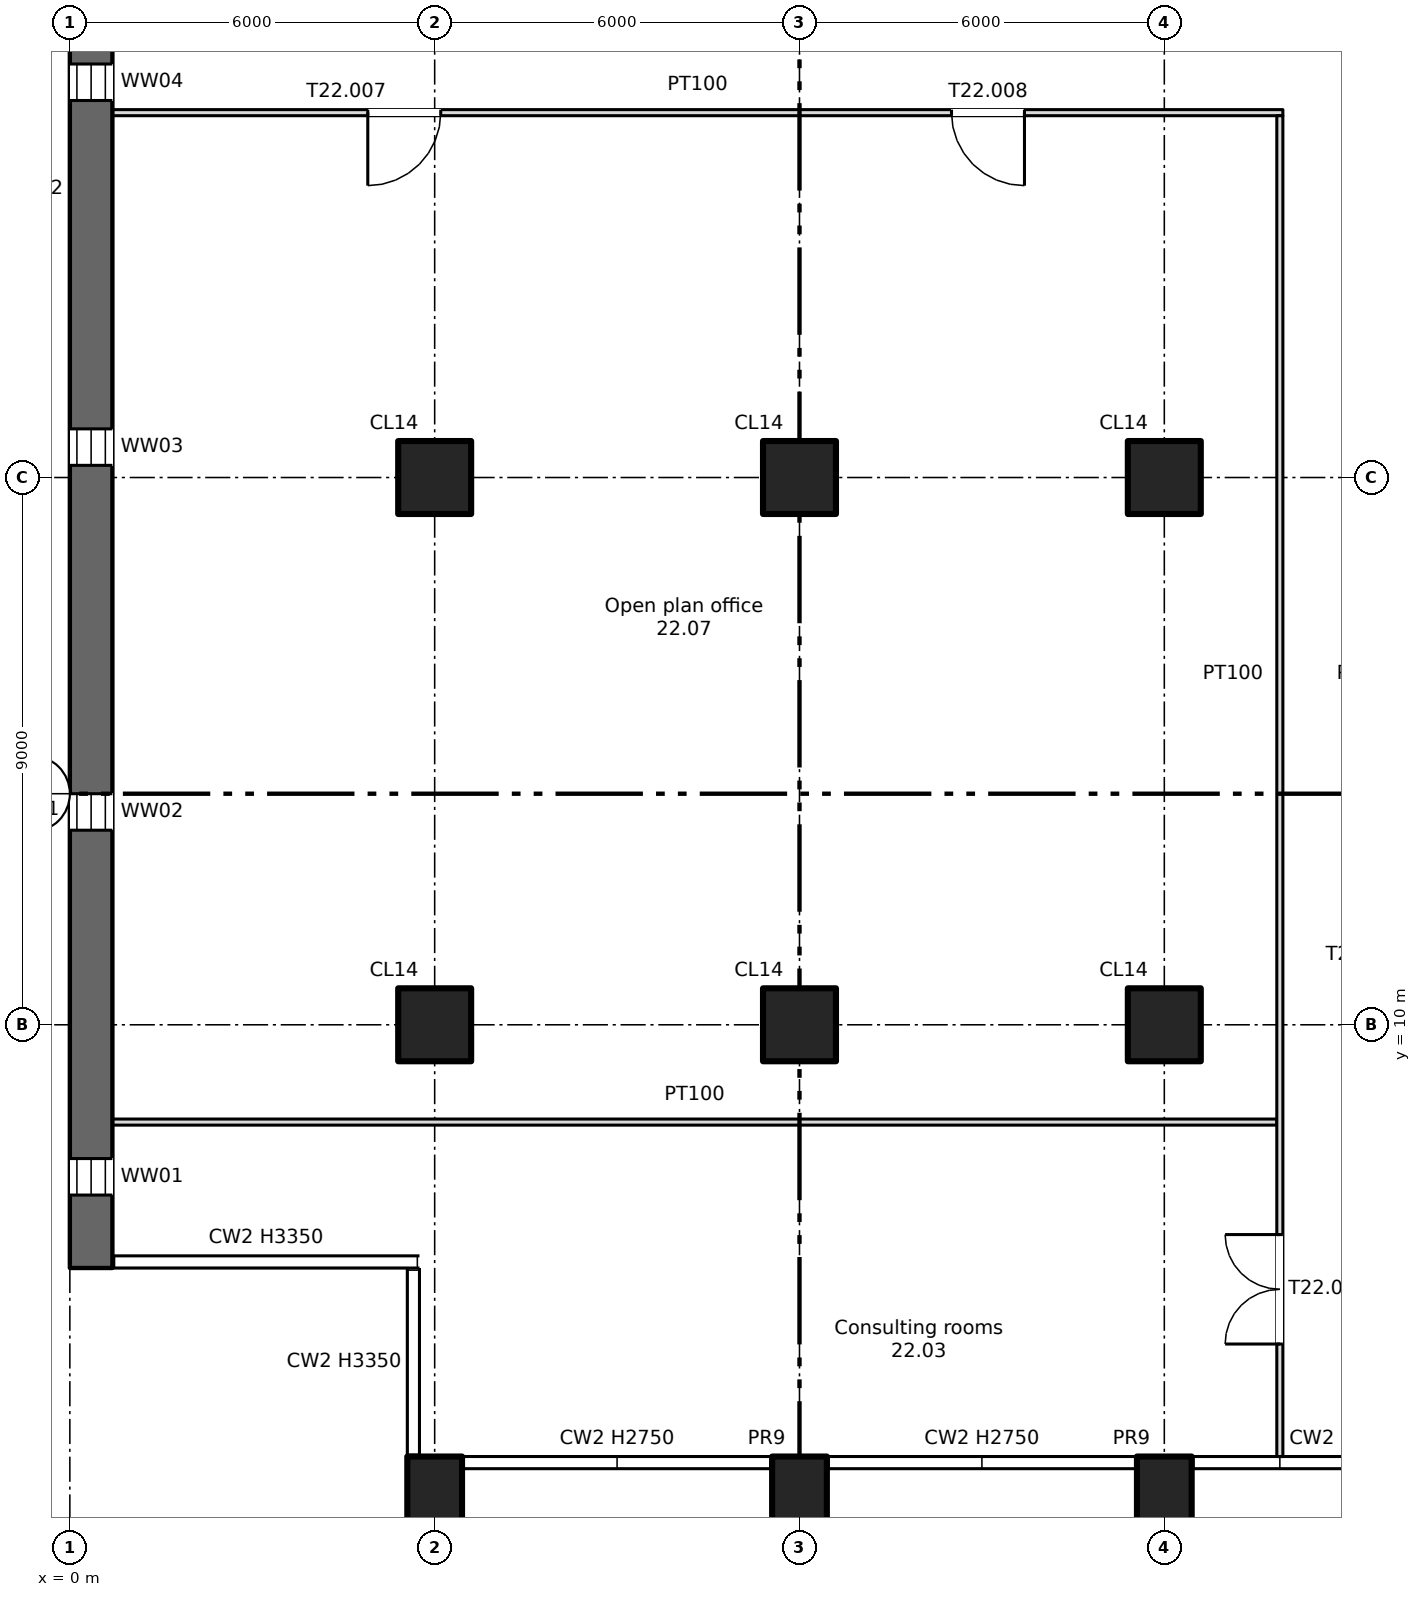
"""IFC4 building model, lengths in metres.
Left out: names, types, materials, properties, quantities, classifications, styles, units other than length and angle.
Written with IfcOpenShell. Run it as: python <this file> out.ifc"""

import sys

from ifc_helpers import new_model, si_unit, direction, frame, frame_2d, origin, origin_2d, place, context, subcontext, project, spatial, rectangle, extrude, element, fill, save


model = new_model("IFC4")
c1 = context("Model", 3, precision=1e-05, world=origin(), true_north=direction((0.0, 1.0)))
c2 = subcontext(c1, "Body", "Model", "MODEL_VIEW")
j1 = project(units=[si_unit("LENGTHUNIT", "METRE"), si_unit("PLANEANGLEUNIT", "RADIAN")], contexts=[c1])
p1 = place(None, origin())
s1 = spatial("IfcSite", under=j1, at=p1, CompositionType="ELEMENT")
p2 = place(p1, origin())
s2 = spatial("IfcBuilding", under=s1, at=p2, CompositionType="ELEMENT")
p3 = place(p2, frame((0.0, 0.0, 147.5)))
s3 = spatial("IfcBuildingStorey", under=s2, at=p3, CompositionType="ELEMENT", Elevation=147.5)
for number, where, z_axis, x_axis in (
    (1, (6.0, 2.2, -0.4), (0.0, 0.0, 1.0), (1.0, 0.0, 0.0)),
    (2, (12.0, 2.2, -0.4), (0.0, 0.0, 1.0), (1.0, 0.0, 0.0)),
    (3, (18.0, 2.2, -0.4), (0.0, 0.0, 1.0), (1.0, 0.0, 0.0)),
):
    element("IfcColumn", number, at=place(p3, frame(where, z_axis=z_axis, x_axis=x_axis)), inside=s3, PredefinedType="COLUMN", context=c2, shape_type="SweptSolid", body=[
        extrude(rectangle(XDim=0.9, YDim=1.4, at=origin_2d()), origin(), (0.0, 0.0, 1.0), 3.75),
    ])
for number, where, z_axis, x_axis in (
    (4, (6.0, 10.0, 0.0), (0.0, 0.0, 1.0), (1.0, 0.0, 0.0)),
    (5, (6.0, 19.0, 0.0), (0.0, 0.0, 1.0), (1.0, 0.0, 0.0)),
    (6, (12.0, 10.0, 0.0), (0.0, 0.0, 1.0), (1.0, 0.0, 0.0)),
    (7, (12.0, 19.0, 0.0), (0.0, 0.0, 1.0), (1.0, 0.0, 0.0)),
    (8, (18.0, 10.0, 0.0), (0.0, 0.0, 1.0), (1.0, 0.0, 0.0)),
    (9, (18.0, 19.0, 0.0), (0.0, 0.0, 1.0), (1.0, 0.0, 0.0)),
):
    element("IfcColumn", number, at=place(p3, frame(where, z_axis=z_axis, x_axis=x_axis)), inside=s3, PredefinedType="COLUMN", context=c2, shape_type="SweptSolid", body=[
        extrude(rectangle(XDim=1.2, YDim=1.2, at=origin_2d()), origin(), (0.0, 0.0, 1.0), 3.35),
    ])
p4 = place(p3, frame((0.35, 6.0, 0.0), z_axis=(0.0, 0.0, 1.0), x_axis=(0.0, 1.0, 0.0)))
e10 = element("IfcWall", 10, at=p4, inside=s3, PredefinedType="SHEAR", context=c2, shape_type="SweptSolid", body=[
    extrude(rectangle(XDim=35.5, YDim=0.7, at=frame_2d((17.75, 0.0))), origin(), (0.0, 0.0, 1.0), 3.35),
])
p5 = place(p4, frame((1.2, 0.0, 0.6)))
e11 = element("IfcOpeningElement", 11, at=p5, cuts=e10, PredefinedType="OPENING", context=c2, shape_type="SweptSolid", body=[
    extrude(rectangle(XDim=0.6, YDim=2.4, at=frame_2d((0.3, 1.2))), frame((0.0, 0.36, 0.0), z_axis=(0.0, -1.0, 0.0), x_axis=(1.0, 0.0, 0.0)), (0.0, 0.0, 1.0), 0.72),
])
p6 = place(p4, frame((7.2, 0.0, 0.6)))
e12 = element("IfcOpeningElement", 12, at=p6, cuts=e10, PredefinedType="OPENING", context=c2, shape_type="SweptSolid", body=[
    extrude(rectangle(XDim=0.6, YDim=2.4, at=frame_2d((0.3, 1.2))), frame((0.0, 0.36, 0.0), z_axis=(0.0, -1.0, 0.0), x_axis=(1.0, 0.0, 0.0)), (0.0, 0.0, 1.0), 0.72),
])
p7 = place(p4, frame((13.2, 0.0, 0.6)))
e13 = element("IfcOpeningElement", 13, at=p7, cuts=e10, PredefinedType="OPENING", context=c2, shape_type="SweptSolid", body=[
    extrude(rectangle(XDim=0.6, YDim=2.4, at=frame_2d((0.3, 1.2))), frame((0.0, 0.36, 0.0), z_axis=(0.0, -1.0, 0.0), x_axis=(1.0, 0.0, 0.0)), (0.0, 0.0, 1.0), 0.72),
])
p8 = place(p4, frame((19.2, 0.0, 0.6)))
e14 = element("IfcOpeningElement", 14, at=p8, cuts=e10, PredefinedType="OPENING", context=c2, shape_type="SweptSolid", body=[
    extrude(rectangle(XDim=0.6, YDim=2.4, at=frame_2d((0.3, 1.2))), frame((0.0, 0.36, 0.0), z_axis=(0.0, -1.0, 0.0), x_axis=(1.0, 0.0, 0.0)), (0.0, 0.0, 1.0), 0.72),
])
p9 = place(p4, frame((25.2, 0.0, 0.6)))
e15 = element("IfcOpeningElement", 15, at=p9, cuts=e10, PredefinedType="OPENING", context=c2, shape_type="SweptSolid", body=[
    extrude(rectangle(XDim=0.6, YDim=2.4, at=frame_2d((0.3, 1.2))), frame((0.0, 0.36, 0.0), z_axis=(0.0, -1.0, 0.0), x_axis=(1.0, 0.0, 0.0)), (0.0, 0.0, 1.0), 0.72),
])
p10 = place(p4, frame((31.2, 0.0, 0.6)))
e16 = element("IfcOpeningElement", 16, at=p10, cuts=e10, PredefinedType="OPENING", context=c2, shape_type="SweptSolid", body=[
    extrude(rectangle(XDim=0.6, YDim=2.4, at=frame_2d((0.3, 1.2))), frame((0.0, 0.36, 0.0), z_axis=(0.0, -1.0, 0.0), x_axis=(1.0, 0.0, 0.0)), (0.0, 0.0, 1.0), 0.72),
])
p11 = place(p3, frame((0.7, 8.4, 0.0), z_axis=(0.0, 0.0, 1.0), x_axis=(1.0, 0.0, 0.0)))
e17 = element("IfcWall", 17, at=p11, inside=s3, PredefinedType="PARTITIONING", context=c2, shape_type="SweptSolid", body=[
    extrude(rectangle(XDim=19.15, YDim=0.1, at=frame_2d((9.575, 0.0))), origin(), (0.0, 0.0, 1.0), 3.35),
])
p12 = place(p3, frame((0.7, 25.0, 0.0), z_axis=(0.0, 0.0, 1.0), x_axis=(1.0, 0.0, 0.0)))
e18 = element("IfcWall", 18, at=p12, inside=s3, PredefinedType="PARTITIONING", context=c2, shape_type="SweptSolid", body=[
    extrude(rectangle(XDim=19.25, YDim=0.1, at=frame_2d((9.625, 0.0))), origin(), (0.0, 0.0, 1.0), 3.35),
])
p13 = place(p12, frame((4.2, 0.0, 0.0)))
e19 = element("IfcOpeningElement", 19, at=p13, cuts=e18, PredefinedType="OPENING", context=c2, shape_type="SweptSolid", body=[
    extrude(rectangle(XDim=1.2, YDim=2.1, at=frame_2d((0.6, 1.05))), frame((0.0, 0.06, 0.0), z_axis=(0.0, -1.0, 0.0), x_axis=(1.0, 0.0, 0.0)), (0.0, 0.0, 1.0), 0.12),
])
p14 = place(p12, frame((13.8, 0.0, 0.0)))
e20 = element("IfcOpeningElement", 20, at=p14, cuts=e18, PredefinedType="OPENING", context=c2, shape_type="SweptSolid", body=[
    extrude(rectangle(XDim=1.2, YDim=2.1, at=frame_2d((0.6, 1.05))), frame((0.0, 0.06, 0.0), z_axis=(0.0, -1.0, 0.0), x_axis=(1.0, 0.0, 0.0)), (0.0, 0.0, 1.0), 0.12),
])
p15 = place(p3, frame((19.9, 2.9, 0.0), z_axis=(0.0, 0.0, 1.0), x_axis=(0.0, 1.0, 0.0)))
e21 = element("IfcWall", 21, at=p15, inside=s3, PredefinedType="PARTITIONING", context=c2, shape_type="SweptSolid", body=[
    extrude(rectangle(XDim=22.05, YDim=0.1, at=frame_2d((11.025, 0.0))), origin(), (0.0, 0.0, 1.0), 3.35),
])
p16 = place(p15, frame((1.85, 0.0, 0.0)))
e22 = element("IfcOpeningElement", 22, at=p16, cuts=e21, PredefinedType="OPENING", context=c2, shape_type="SweptSolid", body=[
    extrude(rectangle(XDim=1.8, YDim=2.1, at=frame_2d((0.9, 1.05))), frame((0.0, 0.06, 0.0), z_axis=(0.0, -1.0, 0.0), x_axis=(1.0, 0.0, 0.0)), (0.0, 0.0, 1.0), 0.12),
])
p17 = place(p5, origin())
e23 = element("IfcWindow", 23, at=p17, inside=s3, PartitioningType="SINGLE_PANEL", PredefinedType="WINDOW", context=c2, shape_type="SweptSolid", body=[
    extrude(rectangle(XDim=0.6, YDim=2.4, at=frame_2d((0.3, 1.2))), frame((0.0, 0.03, 0.0), z_axis=(0.0, -1.0, 0.0), x_axis=(1.0, 0.0, 0.0)), (0.0, 0.0, 1.0), 0.06),
])
fill(e11, e23)
p18 = place(p6, origin())
e24 = element("IfcWindow", 24, at=p18, inside=s3, PartitioningType="SINGLE_PANEL", PredefinedType="WINDOW", context=c2, shape_type="SweptSolid", body=[
    extrude(rectangle(XDim=0.6, YDim=2.4, at=frame_2d((0.3, 1.2))), frame((0.0, 0.03, 0.0), z_axis=(0.0, -1.0, 0.0), x_axis=(1.0, 0.0, 0.0)), (0.0, 0.0, 1.0), 0.06),
])
fill(e12, e24)
p19 = place(p7, origin())
e25 = element("IfcWindow", 25, at=p19, inside=s3, PartitioningType="SINGLE_PANEL", PredefinedType="WINDOW", context=c2, shape_type="SweptSolid", body=[
    extrude(rectangle(XDim=0.6, YDim=2.4, at=frame_2d((0.3, 1.2))), frame((0.0, 0.03, 0.0), z_axis=(0.0, -1.0, 0.0), x_axis=(1.0, 0.0, 0.0)), (0.0, 0.0, 1.0), 0.06),
])
fill(e13, e25)
p20 = place(p8, origin())
e26 = element("IfcWindow", 26, at=p20, inside=s3, PartitioningType="SINGLE_PANEL", PredefinedType="WINDOW", context=c2, shape_type="SweptSolid", body=[
    extrude(rectangle(XDim=0.6, YDim=2.4, at=frame_2d((0.3, 1.2))), frame((0.0, 0.03, 0.0), z_axis=(0.0, -1.0, 0.0), x_axis=(1.0, 0.0, 0.0)), (0.0, 0.0, 1.0), 0.06),
])
fill(e14, e26)
p21 = place(p16, origin())
e27 = element("IfcDoor", 27, at=p21, inside=s3, OperationType="DOUBLE_DOOR_SINGLE_SWING", PredefinedType="DOOR", context=c2, shape_type="SweptSolid", body=[
    extrude(rectangle(XDim=1.8, YDim=2.1, at=frame_2d((0.9, 1.05))), frame((0.0, 0.025, 0.0), z_axis=(0.0, -1.0, 0.0), x_axis=(1.0, 0.0, 0.0)), (0.0, 0.0, 1.0), 0.05),
])
fill(e22, e27)
p22 = place(p13, origin())
e28 = element("IfcDoor", 28, at=p22, inside=s3, OperationType="SINGLE_SWING_LEFT", PredefinedType="DOOR", context=c2, shape_type="SweptSolid", body=[
    extrude(rectangle(XDim=1.2, YDim=2.1, at=frame_2d((0.6, 1.05))), frame((0.0, 0.025, 0.0), z_axis=(0.0, -1.0, 0.0), x_axis=(1.0, 0.0, 0.0)), (0.0, 0.0, 1.0), 0.05),
])
fill(e19, e28)
p23 = place(p14, origin())
e29 = element("IfcDoor", 29, at=p23, inside=s3, OperationType="SINGLE_SWING_RIGHT", PredefinedType="DOOR", context=c2, shape_type="SweptSolid", body=[
    extrude(rectangle(XDim=1.2, YDim=2.1, at=frame_2d((0.6, 1.05))), frame((0.0, 0.025, 0.0), z_axis=(0.0, -1.0, 0.0), x_axis=(1.0, 0.0, 0.0)), (0.0, 0.0, 1.0), 0.05),
])
fill(e20, e29)
save(model, sys.argv[1])
